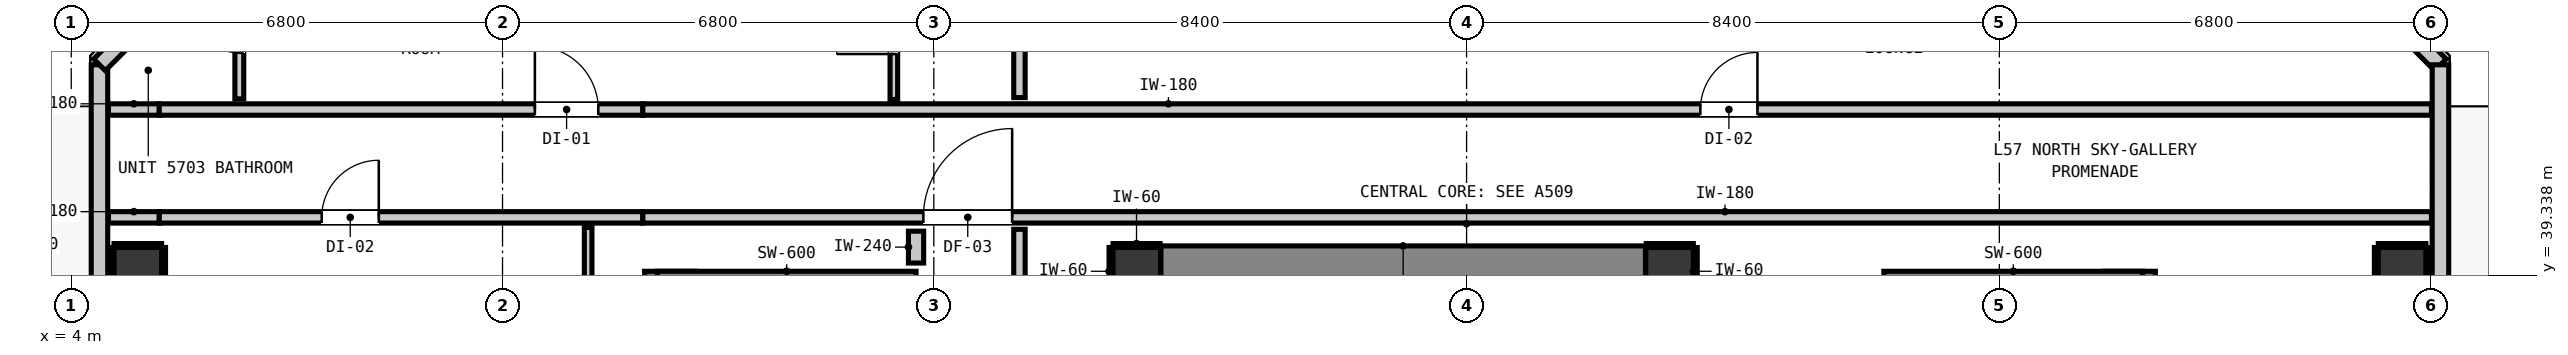
"""IFC4 building model, lengths in metres.
Left out: names, types, materials, properties, quantities, classifications, styles, units other than length and angle.
Written with IfcOpenShell. Run it as: python <this file> out.ifc"""

import sys

from ifc_helpers import new_model, si_unit, direction, frame, frame_2d, origin, origin_2d, place, context, subcontext, project, spatial, rectangle, extrude, element, fill, save


model = new_model("IFC4")
c1 = context("Model", 3, precision=1e-05, world=origin(), true_north=direction((0.0, 1.0)))
c2 = subcontext(c1, "Body", "Model", "MODEL_VIEW")
j1 = project(units=[si_unit("LENGTHUNIT", "METRE"), si_unit("PLANEANGLEUNIT", "RADIAN")], contexts=[c1])
p1 = place(None, origin())
s1 = spatial("IfcSite", under=j1, at=p1, CompositionType="ELEMENT")
p2 = place(p1, origin())
s2 = spatial("IfcBuilding", under=s1, at=p2, CompositionType="ELEMENT")
p3 = place(p2, frame((0.0, 0.0, 196.8)))
s3 = spatial("IfcBuildingStorey", under=s2, at=p3, CompositionType="ELEMENT", Elevation=196.8)
for number, where, z_axis, x_axis in (
    (1, (20.8, 39.4, 0.0), (0.0, 0.0, 1.0), (1.0, 0.0, 0.0)),
    (2, (29.2, 39.4, 0.0), (0.0, 0.0, 1.0), (1.0, 0.0, 0.0)),
):
    element("IfcColumn", number, at=place(p3, frame(where, z_axis=z_axis, x_axis=x_axis)), inside=s3, PredefinedType="COLUMN", context=c2, shape_type="SweptSolid", body=[
        extrude(rectangle(XDim=0.75, YDim=0.75, at=origin_2d()), origin(), (0.0, 0.0, 1.0), 3.32),
    ])
p4 = place(p3, frame((13.44, 31.08, 0.0), z_axis=(0.0, 0.0, 1.0), x_axis=(0.0, 1.0, 0.0)))
e3 = element("IfcWall", 3, at=p4, inside=s3, PredefinedType="SHEAR", context=c2, shape_type="SweptSolid", body=[
    extrude(rectangle(XDim=8.32, YDim=0.8, at=frame_2d((4.16, 0.0))), origin(), (0.0, 0.0, 1.0), 3.32),
])
p5 = place(p3, frame((13.24, 39.1, 0.0), z_axis=(0.0, 0.0, 1.0), x_axis=(1.0, 0.0, 0.0)))
e4 = element("IfcWall", 4, at=p5, inside=s3, PredefinedType="SHEAR", context=c2, shape_type="SweptSolid", body=[
    extrude(rectangle(XDim=4.08, YDim=0.6, at=frame_2d((2.04, 0.0))), origin(), (0.0, 0.0, 1.0), 3.32),
])
p6 = place(p3, frame((36.46, 31.08, 0.0), z_axis=(0.0, 0.0, 1.0), x_axis=(0.0, 1.0, 0.0)))
e5 = element("IfcWall", 5, at=p6, inside=s3, PredefinedType="SHEAR", context=c2, shape_type="SweptSolid", body=[
    extrude(rectangle(XDim=8.32, YDim=0.8, at=frame_2d((4.16, 0.0))), origin(), (0.0, 0.0, 1.0), 3.32),
])
p7 = place(p3, frame((32.58, 39.1, 0.0), z_axis=(0.0, 0.0, 1.0), x_axis=(1.0, 0.0, 0.0)))
e6 = element("IfcWall", 6, at=p7, inside=s3, PredefinedType="SHEAR", context=c2, shape_type="SweptSolid", body=[
    extrude(rectangle(XDim=4.08, YDim=0.6, at=frame_2d((2.04, 0.0))), origin(), (0.0, 0.0, 1.0), 3.32),
])
p8 = place(p3, frame((21.18, 39.4, 0.0), z_axis=(0.0, 0.0, 1.0), x_axis=(1.0, 0.0, 0.0)))
e7 = element("IfcWall", 7, at=p8, inside=s3, PredefinedType="SHEAR", context=c2, shape_type="SweptSolid", body=[
    extrude(rectangle(XDim=7.64, YDim=0.8, at=frame_2d((3.82, 0.0))), origin(), (0.0, 0.0, 1.0), 3.32),
])
for number, where, z_axis, x_axis in (
    (8, (5.05, 39.4, 0.0), (0.0, 0.0, 1.0), (1.0, 0.0, 0.0)),
    (9, (40.75, 39.4, 0.0), (0.0, 0.0, 1.0), (1.0, 0.0, 0.0)),
):
    element("IfcColumn", number, at=place(p3, frame(where, z_axis=z_axis, x_axis=x_axis)), inside=s3, PredefinedType="COLUMN", context=c2, shape_type="SweptSolid", body=[
        extrude(rectangle(XDim=0.75, YDim=0.75, at=origin_2d()), origin(), (0.0, 0.0, 1.0), 3.32),
    ])
p9 = place(p3, frame((4.445, 12.345, 0.0), z_axis=(0.0, 0.0, 1.0), x_axis=(0.0, 1.0, 0.0)))
e10 = element("IfcWall", 10, at=p9, inside=s3, PredefinedType="STANDARD", context=c2, shape_type="SweptSolid", body=[
    extrude(rectangle(XDim=30.31, YDim=0.26, at=frame_2d((15.155, 0.0))), origin(), (0.0, 0.0, 1.0), 3.1),
])
p10 = place(p9, frame((0.91, 0.0, 0.0)))
e11 = element("IfcOpeningElement", 11, at=p10, cuts=e10, PredefinedType="OPENING", context=c2, shape_type="SweptSolid", body=[
    extrude(rectangle(XDim=1.0, YDim=2.15, at=frame_2d((0.5, 1.075))), frame((0.0, 0.14, 0.0), z_axis=(0.0, -1.0, 0.0), x_axis=(1.0, 0.0, 0.0)), (0.0, 0.0, 1.0), 0.28),
])
p11 = place(p9, frame((2.322, 0.0, 0.85)))
e12 = element("IfcOpeningElement", 12, at=p11, cuts=e10, PredefinedType="OPENING", context=c2, shape_type="SweptSolid", body=[
    extrude(rectangle(XDim=0.58, YDim=1.5, at=frame_2d((0.29, 0.75))), frame((0.0, 0.14, 0.0), z_axis=(0.0, -1.0, 0.0), x_axis=(1.0, 0.0, 0.0)), (0.0, 0.0, 1.0), 0.28),
])
p12 = place(p9, frame((22.155, 0.0, 0.85)))
e13 = element("IfcOpeningElement", 13, at=p12, cuts=e10, PredefinedType="OPENING", context=c2, shape_type="SweptSolid", body=[
    extrude(rectangle(XDim=1.1, YDim=2.05, at=frame_2d((0.55, 1.025))), frame((0.0, 0.14, 0.0), z_axis=(0.0, -1.0, 0.0), x_axis=(1.0, 0.0, 0.0)), (0.0, 0.0, 1.0), 0.28),
])
for number, where, z_axis, x_axis in (
    (14, (4.445, 42.655, 0.0), (0.0, 0.0, 1.0), (0.707, 0.707, 0.0)),
    (15, (39.255, 44.755, 0.0), (0.0, 0.0, 1.0), (0.707, -0.707, 0.0)),
):
    element("IfcWall", number, at=place(p3, frame(where, z_axis=z_axis, x_axis=x_axis)), inside=s3, PredefinedType="STANDARD", context=c2, shape_type="SweptSolid", body=[
        extrude(rectangle(XDim=2.97, YDim=0.26, at=frame_2d((1.485, 0.0))), origin(), (0.0, 0.0, 1.0), 3.1),
    ])
p13 = place(p3, frame((41.355, 42.655, 0.0), z_axis=(0.0, 0.0, 1.0), x_axis=(0.0, -1.0, 0.0)))
e16 = element("IfcWall", 16, at=p13, inside=s3, PredefinedType="STANDARD", context=c2, shape_type="SweptSolid", body=[
    extrude(rectangle(XDim=30.31, YDim=0.26, at=frame_2d((15.155, 0.0))), origin(), (0.0, 0.0, 1.0), 3.1),
])
p14 = place(p13, frame((23.818, 0.0, 0.0)))
e17 = element("IfcOpeningElement", 17, at=p14, cuts=e16, PredefinedType="OPENING", context=c2, shape_type="SweptSolid", body=[
    extrude(rectangle(XDim=1.0, YDim=2.15, at=frame_2d((0.5, 1.075))), frame((0.0, 0.14, 0.0), z_axis=(0.0, -1.0, 0.0), x_axis=(1.0, 0.0, 0.0)), (0.0, 0.0, 1.0), 0.28),
])
p15 = place(p13, frame((25.457, 0.0, 0.85)))
e18 = element("IfcOpeningElement", 18, at=p15, cuts=e16, PredefinedType="OPENING", context=c2, shape_type="SweptSolid", body=[
    extrude(rectangle(XDim=1.1, YDim=2.05, at=frame_2d((0.55, 1.025))), frame((0.0, 0.14, 0.0), z_axis=(0.0, -1.0, 0.0), x_axis=(1.0, 0.0, 0.0)), (0.0, 0.0, 1.0), 0.28),
])
p16 = place(p13, frame((28.158, 0.0, 0.85)))
e19 = element("IfcOpeningElement", 19, at=p16, cuts=e16, PredefinedType="OPENING", context=c2, shape_type="SweptSolid", body=[
    extrude(rectangle(XDim=1.1, YDim=2.05, at=frame_2d((0.55, 1.025))), frame((0.0, 0.14, 0.0), z_axis=(0.0, -1.0, 0.0), x_axis=(1.0, 0.0, 0.0)), (0.0, 0.0, 1.0), 0.28),
])
p17 = place(p3, frame((4.587, 40.25, 0.0), z_axis=(0.0, 0.0, 1.0), x_axis=(1.0, 0.0, 0.0)))
e20 = element("IfcWall", 20, at=p17, inside=s3, PredefinedType="PARTITIONING", context=c2, shape_type="SweptSolid", body=[
    extrude(rectangle(XDim=0.801, YDim=0.18, at=frame_2d((0.4, 0.0))), origin(), (0.0, 0.0, 1.0), 3.1),
])
p18 = place(p3, frame((5.388, 40.25, 0.0), z_axis=(0.0, 0.0, 1.0), x_axis=(1.0, 0.0, 0.0)))
e21 = element("IfcWall", 21, at=p18, inside=s3, PredefinedType="PARTITIONING", context=c2, shape_type="SweptSolid", body=[
    extrude(rectangle(XDim=7.624, YDim=0.18, at=frame_2d((3.812, 0.0))), origin(), (0.0, 0.0, 1.0), 2.477),
])
p19 = place(p18, frame((2.561, 0.0, 0.0)))
e22 = element("IfcOpeningElement", 22, at=p19, cuts=e21, PredefinedType="OPENING", context=c2, shape_type="SweptSolid", body=[
    extrude(rectangle(XDim=0.9, YDim=2.1, at=frame_2d((0.45, 1.05))), frame((0.0, 0.1, 0.0), z_axis=(0.0, -1.0, 0.0), x_axis=(1.0, 0.0, 0.0)), (0.0, 0.0, 1.0), 0.2),
])
p20 = place(p3, frame((13.012, 40.25, 0.0), z_axis=(0.0, 0.0, 1.0), x_axis=(1.0, 0.0, 0.0)))
e23 = element("IfcWall", 23, at=p20, inside=s3, PredefinedType="PARTITIONING", context=c2, shape_type="SweptSolid", body=[
    extrude(rectangle(XDim=28.201, YDim=0.18, at=frame_2d((14.101, 0.0))), origin(), (0.0, 0.0, 1.0), 3.1),
])
p21 = place(p20, frame((4.423, 0.0, 0.0)))
e24 = element("IfcOpeningElement", 24, at=p21, cuts=e23, PredefinedType="OPENING", context=c2, shape_type="SweptSolid", body=[
    extrude(rectangle(XDim=1.4, YDim=2.15, at=frame_2d((0.7, 1.075))), frame((0.0, 0.1, 0.0), z_axis=(0.0, -1.0, 0.0), x_axis=(1.0, 0.0, 0.0)), (0.0, 0.0, 1.0), 0.2),
])
p22 = place(p3, frame((4.587, 41.95, 0.0), z_axis=(0.0, 0.0, 1.0), x_axis=(1.0, 0.0, 0.0)))
e25 = element("IfcWall", 25, at=p22, inside=s3, PredefinedType="PARTITIONING", context=c2, shape_type="SweptSolid", body=[
    extrude(rectangle(XDim=0.801, YDim=0.18, at=frame_2d((0.4, 0.0))), origin(), (0.0, 0.0, 1.0), 3.1),
])
p23 = place(p3, frame((5.388, 41.95, 0.0), z_axis=(0.0, 0.0, 1.0), x_axis=(1.0, 0.0, 0.0)))
e26 = element("IfcWall", 26, at=p23, inside=s3, PredefinedType="PARTITIONING", context=c2, shape_type="SweptSolid", body=[
    extrude(rectangle(XDim=7.624, YDim=0.18, at=frame_2d((3.812, 0.0))), origin(), (0.0, 0.0, 1.0), 2.477),
])
p24 = place(p23, frame((5.922, 0.0, 0.0)))
e27 = element("IfcOpeningElement", 27, at=p24, cuts=e26, PredefinedType="OPENING", context=c2, shape_type="SweptSolid", body=[
    extrude(rectangle(XDim=1.0, YDim=2.15, at=frame_2d((0.5, 1.075))), frame((0.0, 0.1, 0.0), z_axis=(0.0, -1.0, 0.0), x_axis=(1.0, 0.0, 0.0)), (0.0, 0.0, 1.0), 0.2),
])
p25 = place(p3, frame((13.012, 41.95, 0.0), z_axis=(0.0, 0.0, 1.0), x_axis=(1.0, 0.0, 0.0)))
e28 = element("IfcWall", 28, at=p25, inside=s3, PredefinedType="PARTITIONING", context=c2, shape_type="SweptSolid", body=[
    extrude(rectangle(XDim=28.201, YDim=0.18, at=frame_2d((14.101, 0.0))), origin(), (0.0, 0.0, 1.0), 3.1),
])
p26 = place(p25, frame((16.674, 0.0, 0.0)))
e29 = element("IfcOpeningElement", 29, at=p26, cuts=e28, PredefinedType="OPENING", context=c2, shape_type="SweptSolid", body=[
    extrude(rectangle(XDim=0.9, YDim=2.1, at=frame_2d((0.45, 1.05))), frame((0.0, 0.1, 0.0), z_axis=(0.0, -1.0, 0.0), x_axis=(1.0, 0.0, 0.0)), (0.0, 0.0, 1.0), 0.2),
])
p27 = place(p3, frame((17.32, 39.53, 0.0), z_axis=(0.0, 0.0, 1.0), x_axis=(0.0, 1.0, 0.0)))
e30 = element("IfcWall", 30, at=p27, inside=s3, PredefinedType="PARTITIONING", context=c2, shape_type="SweptSolid", body=[
    extrude(rectangle(XDim=0.502, YDim=0.24, at=frame_2d((0.251, 0.0))), origin(), (0.0, 0.0, 1.0), 3.1),
])
p28 = place(p3, frame((18.95, 39.058, 0.0), z_axis=(0.0, 0.0, 1.0), x_axis=(0.0, 1.0, 0.0)))
e31 = element("IfcWall", 31, at=p28, inside=s3, PredefinedType="PARTITIONING", context=c2, shape_type="SweptSolid", body=[
    extrude(rectangle(XDim=1.004, YDim=0.18, at=frame_2d((0.502, 0.0))), origin(), (0.0, 0.0, 1.0), 3.1),
])
p29 = place(p3, frame((18.95, 42.138, 0.0), z_axis=(0.0, 0.0, 1.0), x_axis=(0.0, 1.0, 0.0)))
e32 = element("IfcWall", 32, at=p29, inside=s3, PredefinedType="PARTITIONING", context=c2, shape_type="SweptSolid", body=[
    extrude(rectangle(XDim=2.475, YDim=0.18, at=frame_2d((1.238, 0.0))), origin(), (0.0, 0.0, 1.0), 3.1),
])
p30 = place(p3, frame((6.65, 42.118, 0.0), z_axis=(0.0, 0.0, 1.0), x_axis=(0.0, 1.0, 0.0)))
e33 = element("IfcWall", 33, at=p30, inside=s3, PredefinedType="PARTITIONING", context=c2, shape_type="SweptSolid", body=[
    extrude(rectangle(XDim=2.495, YDim=0.14, at=frame_2d((1.248, 0.0))), origin(), (0.0, 0.0, 1.0), 3.1),
])
p31 = place(p30, frame((0.727, 0.0, 0.0)))
e34 = element("IfcOpeningElement", 34, at=p31, cuts=e33, PredefinedType="OPENING", context=c2, shape_type="SweptSolid", body=[
    extrude(rectangle(XDim=0.86, YDim=2.02, at=frame_2d((0.43, 1.01))), frame((0.0, 0.08, 0.0), z_axis=(0.0, -1.0, 0.0), x_axis=(1.0, 0.0, 0.0)), (0.0, 0.0, 1.0), 0.16),
])
p32 = place(p3, frame((12.15, 29.938, 0.0), z_axis=(0.0, 0.0, 1.0), x_axis=(0.0, 1.0, 0.0)))
e35 = element("IfcWall", 35, at=p32, inside=s3, PredefinedType="PARTITIONING", context=c2, shape_type="SweptSolid", body=[
    extrude(rectangle(XDim=10.154, YDim=0.12, at=frame_2d((5.077, 0.0))), origin(), (0.0, 0.0, 1.0), 3.1),
])
p33 = place(p3, frame((16.97, 42.108, 0.0), z_axis=(0.0, 0.0, 1.0), x_axis=(0.0, 1.0, 0.0)))
e36 = element("IfcWall", 36, at=p33, inside=s3, PredefinedType="PARTITIONING", context=c2, shape_type="SweptSolid", body=[
    extrude(rectangle(XDim=2.505, YDim=0.12, at=frame_2d((1.252, 0.0))), origin(), (0.0, 0.0, 1.0), 3.1),
])
p34 = place(p33, frame((0.717, 0.0, 0.0)))
e37 = element("IfcOpeningElement", 37, at=p34, cuts=e36, PredefinedType="OPENING", context=c2, shape_type="SweptSolid", body=[
    extrude(rectangle(XDim=0.9, YDim=2.1, at=frame_2d((0.45, 1.05))), frame((0.0, 0.07, 0.0), z_axis=(0.0, -1.0, 0.0), x_axis=(1.0, 0.0, 0.0)), (0.0, 0.0, 1.0), 0.14),
])
p35 = place(p3, frame((20.425, 39.807, 0.0), z_axis=(0.0, 0.0, 1.0), x_axis=(1.0, 0.0, 0.0)))
e38 = element("IfcWall", 38, at=p35, inside=s3, PredefinedType="PARTITIONING", context=c2, shape_type="SweptSolid", body=[
    extrude(rectangle(XDim=0.742, YDim=0.06, at=frame_2d((0.371, 0.0))), origin(), (0.0, 0.0, 1.0), 1.45),
])
p36 = place(p3, frame((20.393, 39.025, 0.0), z_axis=(0.0, 0.0, 1.0), x_axis=(0.0, 1.0, 0.0)))
e39 = element("IfcWall", 39, at=p36, inside=s3, PredefinedType="PARTITIONING", context=c2, shape_type="SweptSolid", body=[
    extrude(rectangle(XDim=0.75, YDim=0.06, at=frame_2d((0.375, 0.0))), origin(), (0.0, 0.0, 1.0), 1.45),
])
p37 = place(p3, frame((28.833, 39.807, 0.0), z_axis=(0.0, 0.0, 1.0), x_axis=(1.0, 0.0, 0.0)))
e40 = element("IfcWall", 40, at=p37, inside=s3, PredefinedType="PARTITIONING", context=c2, shape_type="SweptSolid", body=[
    extrude(rectangle(XDim=0.742, YDim=0.06, at=frame_2d((0.371, 0.0))), origin(), (0.0, 0.0, 1.0), 1.45),
])
for number, where, z_axis, x_axis in (
    (41, (29.607, 39.025, 0.0), (0.0, 0.0, 1.0), (0.0, 1.0, 0.0)),
    (42, (4.675, 39.807, 0.0), (0.0, 0.0, 1.0), (1.0, 0.0, 0.0)),
    (43, (4.643, 39.025, 0.0), (0.0, 0.0, 1.0), (0.0, 1.0, 0.0)),
    (44, (5.457, 39.025, 0.0), (0.0, 0.0, 1.0), (0.0, 1.0, 0.0)),
    (45, (40.375, 39.807, 0.0), (0.0, 0.0, 1.0), (1.0, 0.0, 0.0)),
    (46, (40.343, 39.025, 0.0), (0.0, 0.0, 1.0), (0.0, 1.0, 0.0)),
    (47, (41.157, 39.025, 0.0), (0.0, 0.0, 1.0), (0.0, 1.0, 0.0)),
):
    element("IfcWall", number, at=place(p3, frame(where, z_axis=z_axis, x_axis=x_axis)), inside=s3, PredefinedType="PARTITIONING", context=c2, shape_type="SweptSolid", body=[
        extrude(rectangle(XDim=0.75, YDim=0.06, at=frame_2d((0.375, 0.0))), origin(), (0.0, 0.0, 1.0), 1.45),
    ])
p38 = place(p21, origin())
e48 = element("IfcDoor", 48, at=p38, inside=s3, OperationType="SINGLE_SWING_RIGHT", PredefinedType="DOOR", context=c2, shape_type="SweptSolid", body=[
    extrude(rectangle(XDim=1.4, YDim=2.15, at=frame_2d((0.7, 1.075))), frame((0.0, 0.025, 0.0), z_axis=(0.0, -1.0, 0.0), x_axis=(1.0, 0.0, 0.0)), (0.0, 0.0, 1.0), 0.05),
])
fill(e24, e48)
p39 = place(p24, origin())
e49 = element("IfcDoor", 49, at=p39, inside=s3, OperationType="SINGLE_SWING_LEFT", PredefinedType="DOOR", context=c2, shape_type="SweptSolid", body=[
    extrude(rectangle(XDim=1.0, YDim=2.15, at=frame_2d((0.5, 1.075))), frame((0.0, 0.025, 0.0), z_axis=(0.0, -1.0, 0.0), x_axis=(1.0, 0.0, 0.0)), (0.0, 0.0, 1.0), 0.05),
])
fill(e27, e49)
p40 = place(p31, origin())
e50 = element("IfcDoor", 50, at=p40, inside=s3, OperationType="SINGLE_SWING_RIGHT", PredefinedType="DOOR", context=c2, shape_type="SweptSolid", body=[
    extrude(rectangle(XDim=0.86, YDim=2.02, at=frame_2d((0.43, 1.01))), frame((0.0, 0.025, 0.0), z_axis=(0.0, -1.0, 0.0), x_axis=(1.0, 0.0, 0.0)), (0.0, 0.0, 1.0), 0.05),
])
fill(e34, e50)
p41 = place(p34, origin())
e51 = element("IfcDoor", 51, at=p41, inside=s3, OperationType="SINGLE_SWING_LEFT", PredefinedType="DOOR", context=c2, shape_type="SweptSolid", body=[
    extrude(rectangle(XDim=0.9, YDim=2.1, at=frame_2d((0.45, 1.05))), frame((0.0, 0.025, 0.0), z_axis=(0.0, -1.0, 0.0), x_axis=(1.0, 0.0, 0.0)), (0.0, 0.0, 1.0), 0.05),
])
fill(e37, e51)
p42 = place(p26, origin())
e52 = element("IfcDoor", 52, at=p42, inside=s3, OperationType="SINGLE_SWING_RIGHT", PredefinedType="DOOR", context=c2, shape_type="SweptSolid", body=[
    extrude(rectangle(XDim=0.9, YDim=2.1, at=frame_2d((0.45, 1.05))), frame((0.0, 0.025, 0.0), z_axis=(0.0, -1.0, 0.0), x_axis=(1.0, 0.0, 0.0)), (0.0, 0.0, 1.0), 0.05),
])
fill(e29, e52)
p43 = place(p19, origin())
e53 = element("IfcDoor", 53, at=p43, inside=s3, OperationType="SINGLE_SWING_RIGHT", PredefinedType="DOOR", context=c2, shape_type="SweptSolid", body=[
    extrude(rectangle(XDim=0.9, YDim=2.1, at=frame_2d((0.45, 1.05))), frame((0.0, 0.025, 0.0), z_axis=(0.0, -1.0, 0.0), x_axis=(1.0, 0.0, 0.0)), (0.0, 0.0, 1.0), 0.05),
])
fill(e22, e53)
save(model, sys.argv[1])
